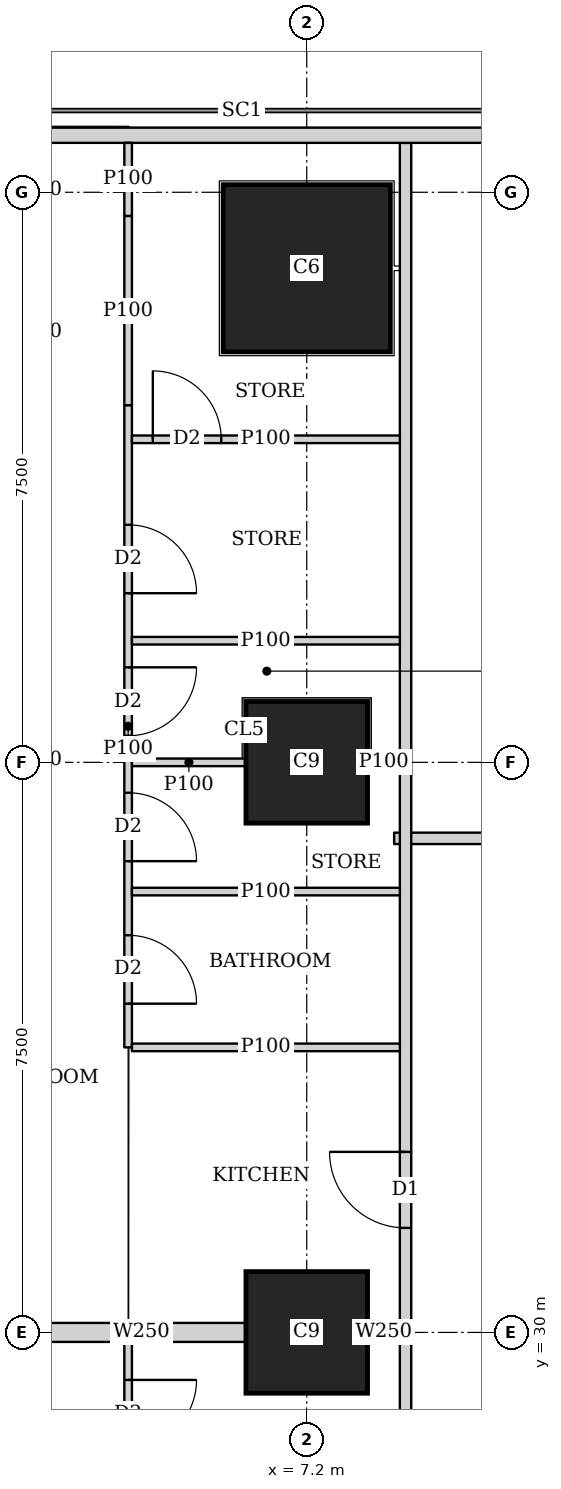
"""IFC4 building model, lengths in metres.
Left out: names, types, materials, properties, quantities, classifications, styles, units other than length and angle.
Written with IfcOpenShell. Run it as: python <this file> out.ifc"""

import sys

from ifc_helpers import new_model, si_unit, direction, frame, frame_2d, origin, origin_2d, place, context, subcontext, project, spatial, rectangle, extrude, element, fill, save


model = new_model("IFC4")
c1 = context("Model", 3, precision=1e-05, world=origin(), true_north=direction((0.0, 1.0)))
c2 = subcontext(c1, "Body", "Model", "MODEL_VIEW")
j1 = project(units=[si_unit("LENGTHUNIT", "METRE"), si_unit("PLANEANGLEUNIT", "RADIAN")], contexts=[c1])
p1 = place(None, origin())
s1 = spatial("IfcSite", under=j1, at=p1, CompositionType="ELEMENT")
p2 = place(p1, origin())
s2 = spatial("IfcBuilding", under=s1, at=p2, CompositionType="ELEMENT")
p3 = place(p2, frame((0.0, 0.0, 89.15)))
s3 = spatial("IfcBuildingStorey", under=s2, at=p3, CompositionType="ELEMENT", Elevation=89.15)
for number, where, z_axis, x_axis in (
    (1, (7.2, 30.0, 0.0), (0.0, 0.0, 1.0), (1.0, 0.0, 0.0)),
    (2, (7.2, 37.5, 0.0), (0.0, 0.0, 1.0), (1.0, 0.0, 0.0)),
):
    element("IfcColumn", number, at=place(p3, frame(where, z_axis=z_axis, x_axis=x_axis)), inside=s3, PredefinedType="COLUMN", context=c2, shape_type="SweptSolid", body=[
        extrude(rectangle(XDim=1.6, YDim=1.6, at=origin_2d()), origin(), (0.0, 0.0, 1.0), 3.75),
    ])
p4 = place(p3, frame((7.2, 44.0, 0.0), z_axis=(0.0, 0.0, 1.0), x_axis=(1.0, 0.0, 0.0)))
e3 = element("IfcColumn", 3, at=p4, inside=s3, PredefinedType="COLUMN", context=c2, shape_type="SweptSolid", body=[
    extrude(rectangle(XDim=2.2, YDim=2.2, at=origin_2d()), origin(), (0.0, 0.0, 1.0), 3.75),
])
p5 = place(p3, frame((40.106, 45.75, 0.0), z_axis=(0.0, 0.0, 1.0), x_axis=(-1.0, 0.0, 0.0)))
e4 = element("IfcWall", 4, at=p5, inside=s3, PredefinedType="SOLIDWALL", context=c2, shape_type="SweptSolid", body=[
    extrude(rectangle(XDim=37.943, YDim=0.2, at=frame_2d((18.971, 0.0))), origin(), (0.0, 0.0, 1.0), 3.5),
])
p6 = place(p5, frame((8.606, 0.0, 0.9)))
e5 = element("IfcOpeningElement", 5, at=p6, cuts=e4, PredefinedType="OPENING", context=c2, shape_type="SweptSolid", body=[
    extrude(rectangle(XDim=1.8, YDim=1.5, at=frame_2d((0.9, 0.75))), frame((0.0, 0.11, 0.0), z_axis=(0.0, -1.0, 0.0), x_axis=(1.0, 0.0, 0.0)), (0.0, 0.0, 1.0), 0.22),
])
p7 = place(p5, frame((12.206, 0.0, 0.9)))
e6 = element("IfcOpeningElement", 6, at=p7, cuts=e4, PredefinedType="OPENING", context=c2, shape_type="SweptSolid", body=[
    extrude(rectangle(XDim=1.8, YDim=1.5, at=frame_2d((0.9, 0.75))), frame((0.0, 0.11, 0.0), z_axis=(0.0, -1.0, 0.0), x_axis=(1.0, 0.0, 0.0)), (0.0, 0.0, 1.0), 0.22),
])
p8 = place(p5, frame((15.806, 0.0, 0.9)))
e7 = element("IfcOpeningElement", 7, at=p8, cuts=e4, PredefinedType="OPENING", context=c2, shape_type="SweptSolid", body=[
    extrude(rectangle(XDim=1.8, YDim=1.5, at=frame_2d((0.9, 0.75))), frame((0.0, 0.11, 0.0), z_axis=(0.0, -1.0, 0.0), x_axis=(1.0, 0.0, 0.0)), (0.0, 0.0, 1.0), 0.22),
])
p9 = place(p5, frame((19.406, 0.0, 0.9)))
e8 = element("IfcOpeningElement", 8, at=p9, cuts=e4, PredefinedType="OPENING", context=c2, shape_type="SweptSolid", body=[
    extrude(rectangle(XDim=1.8, YDim=1.5, at=frame_2d((0.9, 0.75))), frame((0.0, 0.11, 0.0), z_axis=(0.0, -1.0, 0.0), x_axis=(1.0, 0.0, 0.0)), (0.0, 0.0, 1.0), 0.22),
])
p10 = place(p5, frame((23.006, 0.0, 0.9)))
e9 = element("IfcOpeningElement", 9, at=p10, cuts=e4, PredefinedType="OPENING", context=c2, shape_type="SweptSolid", body=[
    extrude(rectangle(XDim=1.8, YDim=1.5, at=frame_2d((0.9, 0.75))), frame((0.0, 0.11, 0.0), z_axis=(0.0, -1.0, 0.0), x_axis=(1.0, 0.0, 0.0)), (0.0, 0.0, 1.0), 0.22),
])
p11 = place(p5, frame((26.606, 0.0, 0.9)))
e10 = element("IfcOpeningElement", 10, at=p11, cuts=e4, PredefinedType="OPENING", context=c2, shape_type="SweptSolid", body=[
    extrude(rectangle(XDim=1.8, YDim=1.5, at=frame_2d((0.9, 0.75))), frame((0.0, 0.11, 0.0), z_axis=(0.0, -1.0, 0.0), x_axis=(1.0, 0.0, 0.0)), (0.0, 0.0, 1.0), 0.22),
])
p12 = place(p3, frame((8.5, -0.65, 0.0), z_axis=(0.0, 0.0, 1.0), x_axis=(0.0, 1.0, 0.0)))
e11 = element("IfcWall", 11, at=p12, inside=s3, PredefinedType="SOLIDWALL", context=c2, shape_type="SweptSolid", body=[
    extrude(rectangle(XDim=46.3, YDim=0.15, at=frame_2d((23.15, 0.0))), origin(), (0.0, 0.0, 1.0), 2.2),
])
p13 = place(p12, frame((9.525, 0.0, 0.0)))
e12 = element("IfcOpeningElement", 12, at=p13, cuts=e11, PredefinedType="OPENING", context=c2, shape_type="SweptSolid", body=[
    extrude(rectangle(XDim=1.0, YDim=2.1, at=frame_2d((0.5, 1.05))), frame((0.0, 0.085, 0.0), z_axis=(0.0, -1.0, 0.0), x_axis=(1.0, 0.0, 0.0)), (0.0, 0.0, 1.0), 0.17),
])
p14 = place(p12, frame((13.275, 0.0, 0.0)))
e13 = element("IfcOpeningElement", 13, at=p14, cuts=e11, PredefinedType="OPENING", context=c2, shape_type="SweptSolid", body=[
    extrude(rectangle(XDim=1.0, YDim=2.1, at=frame_2d((0.5, 1.05))), frame((0.0, 0.085, 0.0), z_axis=(0.0, -1.0, 0.0), x_axis=(1.0, 0.0, 0.0)), (0.0, 0.0, 1.0), 0.17),
])
p15 = place(p12, frame((20.775, 0.0, 0.0)))
e14 = element("IfcOpeningElement", 14, at=p15, cuts=e11, PredefinedType="OPENING", context=c2, shape_type="SweptSolid", body=[
    extrude(rectangle(XDim=1.0, YDim=2.1, at=frame_2d((0.5, 1.05))), frame((0.0, 0.085, 0.0), z_axis=(0.0, -1.0, 0.0), x_axis=(1.0, 0.0, 0.0)), (0.0, 0.0, 1.0), 0.17),
])
p16 = place(p12, frame((32.025, 0.0, 0.0)))
e15 = element("IfcOpeningElement", 15, at=p16, cuts=e11, PredefinedType="OPENING", context=c2, shape_type="SweptSolid", body=[
    extrude(rectangle(XDim=1.0, YDim=2.1, at=frame_2d((0.5, 1.05))), frame((0.0, 0.085, 0.0), z_axis=(0.0, -1.0, 0.0), x_axis=(1.0, 0.0, 0.0)), (0.0, 0.0, 1.0), 0.17),
])
p17 = place(p3, frame((8.35, 36.5, 0.0), z_axis=(0.0, 0.0, 1.0), x_axis=(1.0, 0.0, 0.0)))
e16 = element("IfcWall", 16, at=p17, inside=s3, PredefinedType="SOLIDWALL", context=c2, shape_type="SweptSolid", body=[
    extrude(rectangle(XDim=26.415, YDim=0.15, at=frame_2d((13.208, 0.0))), origin(), (0.0, 0.0, 1.0), 3.5),
])
p18 = place(p17, frame((2.6, 0.0, 0.0)))
e17 = element("IfcOpeningElement", 17, at=p18, cuts=e16, PredefinedType="OPENING", context=c2, shape_type="SweptSolid", body=[
    extrude(rectangle(XDim=1.0, YDim=2.1, at=frame_2d((0.5, 1.05))), frame((0.0, 0.085, 0.0), z_axis=(0.0, -1.0, 0.0), x_axis=(1.0, 0.0, 0.0)), (0.0, 0.0, 1.0), 0.17),
])
p19 = place(p17, frame((10.75, 0.0, 0.0)))
e18 = element("IfcOpeningElement", 18, at=p19, cuts=e16, PredefinedType="OPENING", context=c2, shape_type="SweptSolid", body=[
    extrude(rectangle(XDim=1.0, YDim=2.1, at=frame_2d((0.5, 1.05))), frame((0.0, 0.085, 0.0), z_axis=(0.0, -1.0, 0.0), x_axis=(1.0, 0.0, 0.0)), (0.0, 0.0, 1.0), 0.17),
])
p20 = place(p17, frame((18.007, 0.0, 0.0)))
e19 = element("IfcOpeningElement", 19, at=p20, cuts=e16, PredefinedType="OPENING", context=c2, shape_type="SweptSolid", body=[
    extrude(rectangle(XDim=1.0, YDim=2.1, at=frame_2d((0.5, 1.05))), frame((0.0, 0.085, 0.0), z_axis=(0.0, -1.0, 0.0), x_axis=(1.0, 0.0, 0.0)), (0.0, 0.0, 1.0), 0.17),
])
p21 = place(p3, frame((4.85, 22.5, 0.0), z_axis=(0.0, 0.0, 1.0), x_axis=(0.0, 1.0, 0.0)))
e20 = element("IfcWall", 20, at=p21, inside=s3, PredefinedType="PARTITIONING", context=c2, shape_type="SweptSolid", body=[
    extrude(rectangle(XDim=7.375, YDim=0.1, at=frame_2d((3.688, 0.0))), origin(), (0.0, 0.0, 1.0), 3.5),
])
p22 = place(p21, frame((0.575, 0.0, 0.0)))
e21 = element("IfcOpeningElement", 21, at=p22, cuts=e20, PredefinedType="OPENING", context=c2, shape_type="SweptSolid", body=[
    extrude(rectangle(XDim=0.9, YDim=2.1, at=frame_2d((0.45, 1.05))), frame((0.0, 0.06, 0.0), z_axis=(0.0, -1.0, 0.0), x_axis=(1.0, 0.0, 0.0)), (0.0, 0.0, 1.0), 0.12),
])
p23 = place(p21, frame((4.1, 0.0, 0.0)))
e22 = element("IfcOpeningElement", 22, at=p23, cuts=e20, PredefinedType="OPENING", context=c2, shape_type="SweptSolid", body=[
    extrude(rectangle(XDim=0.9, YDim=2.1, at=frame_2d((0.45, 1.05))), frame((0.0, 0.06, 0.0), z_axis=(0.0, -1.0, 0.0), x_axis=(1.0, 0.0, 0.0)), (0.0, 0.0, 1.0), 0.12),
])
p24 = place(p21, frame((2.45, 0.0, 0.0)))
e23 = element("IfcOpeningElement", 23, at=p24, cuts=e20, PredefinedType="OPENING", context=c2, shape_type="SweptSolid", body=[
    extrude(rectangle(XDim=0.9, YDim=2.1, at=frame_2d((0.45, 1.05))), frame((0.0, 0.06, 0.0), z_axis=(0.0, -1.0, 0.0), x_axis=(1.0, 0.0, 0.0)), (0.0, 0.0, 1.0), 0.12),
])
p25 = place(p21, frame((5.975, 0.0, 0.0)))
e24 = element("IfcOpeningElement", 24, at=p25, cuts=e20, PredefinedType="OPENING", context=c2, shape_type="SweptSolid", body=[
    extrude(rectangle(XDim=0.9, YDim=2.1, at=frame_2d((0.45, 1.05))), frame((0.0, 0.06, 0.0), z_axis=(0.0, -1.0, 0.0), x_axis=(1.0, 0.0, 0.0)), (0.0, 0.0, 1.0), 0.12),
])
p26 = place(p3, frame((4.85, 33.75, 0.0), z_axis=(0.0, 0.0, 1.0), x_axis=(0.0, 1.0, 0.0)))
e25 = element("IfcWall", 25, at=p26, inside=s3, PredefinedType="PARTITIONING", context=c2, shape_type="SweptSolid", body=[
    extrude(rectangle(XDim=8.449, YDim=0.1, at=frame_2d((4.225, 0.0))), origin(), (0.0, 0.0, 1.0), 3.5),
])
p27 = place(p26, frame((0.575, 0.0, 0.0)))
e26 = element("IfcOpeningElement", 26, at=p27, cuts=e25, PredefinedType="OPENING", context=c2, shape_type="SweptSolid", body=[
    extrude(rectangle(XDim=0.9, YDim=2.1, at=frame_2d((0.45, 1.05))), frame((0.0, 0.06, 0.0), z_axis=(0.0, -1.0, 0.0), x_axis=(1.0, 0.0, 0.0)), (0.0, 0.0, 1.0), 0.12),
])
p28 = place(p26, frame((4.1, 0.0, 0.0)))
e27 = element("IfcOpeningElement", 27, at=p28, cuts=e25, PredefinedType="OPENING", context=c2, shape_type="SweptSolid", body=[
    extrude(rectangle(XDim=0.9, YDim=2.1, at=frame_2d((0.45, 1.05))), frame((0.0, 0.06, 0.0), z_axis=(0.0, -1.0, 0.0), x_axis=(1.0, 0.0, 0.0)), (0.0, 0.0, 1.0), 0.12),
])
p29 = place(p26, frame((2.45, 0.0, 0.0)))
e28 = element("IfcOpeningElement", 28, at=p29, cuts=e25, PredefinedType="OPENING", context=c2, shape_type="SweptSolid", body=[
    extrude(rectangle(XDim=0.9, YDim=2.1, at=frame_2d((0.45, 1.05))), frame((0.0, 0.06, 0.0), z_axis=(0.0, -1.0, 0.0), x_axis=(1.0, 0.0, 0.0)), (0.0, 0.0, 1.0), 0.12),
])
p30 = place(p26, frame((5.975, 0.0, 0.0)))
e29 = element("IfcOpeningElement", 29, at=p30, cuts=e25, PredefinedType="OPENING", context=c2, shape_type="SweptSolid", body=[
    extrude(rectangle(XDim=0.9, YDim=2.1, at=frame_2d((0.45, 1.05))), frame((0.0, 0.06, 0.0), z_axis=(0.0, -1.0, 0.0), x_axis=(1.0, 0.0, 0.0)), (0.0, 0.0, 1.0), 0.12),
])
p31 = place(p3, frame((4.85, 42.199, 0.0), z_axis=(0.0, 0.0, 1.0), x_axis=(0.0, 1.0, 0.0)))
e30 = element("IfcWall", 30, at=p31, inside=s3, PredefinedType="PARTITIONING", context=c2, shape_type="SweptSolid", body=[
    extrude(rectangle(XDim=2.49, YDim=0.1, at=frame_2d((1.245, 0.0))), origin(), (0.0, 0.0, 1.0), 2.05),
])
p32 = place(p3, frame((4.85, 44.689, 0.0), z_axis=(0.0, 0.0, 1.0), x_axis=(0.0, 1.0, 0.0)))
e31 = element("IfcWall", 31, at=p32, inside=s3, PredefinedType="PARTITIONING", context=c2, shape_type="SweptSolid", body=[
    extrude(rectangle(XDim=0.961, YDim=0.1, at=frame_2d((0.48, 0.0))), origin(), (0.0, 0.0, 1.0), 3.5),
])
p33 = place(p3, frame((4.9, 33.75, 0.0), z_axis=(0.0, 0.0, 1.0), x_axis=(1.0, 0.0, 0.0)))
e32 = element("IfcWall", 32, at=p33, inside=s3, PredefinedType="PARTITIONING", context=c2, shape_type="SweptSolid", body=[
    extrude(rectangle(XDim=3.525, YDim=0.1, at=frame_2d((1.763, 0.0))), origin(), (0.0, 0.0, 1.0), 3.5),
])
p34 = place(p3, frame((4.9, 37.5, 0.0), z_axis=(0.0, 0.0, 1.0), x_axis=(1.0, 0.0, 0.0)))
e33 = element("IfcWall", 33, at=p34, inside=s3, PredefinedType="PARTITIONING", context=c2, shape_type="SweptSolid", body=[
    extrude(rectangle(XDim=1.499, YDim=0.1, at=frame_2d((0.75, 0.0))), origin(), (0.0, 0.0, 1.0), 3.5),
])
p35 = place(p3, frame((8.001, 37.5, 0.0), z_axis=(0.0, 0.0, 1.0), x_axis=(1.0, 0.0, 0.0)))
e34 = element("IfcWall", 34, at=p35, inside=s3, PredefinedType="PARTITIONING", context=c2, shape_type="SweptSolid", body=[
    extrude(rectangle(XDim=0.424, YDim=0.1, at=frame_2d((0.212, 0.0))), origin(), (0.0, 0.0, 1.0), 3.5),
])
for number, where, z_axis, x_axis in (
    (35, (4.9, 35.8, 0.0), (0.0, 0.0, 1.0), (1.0, 0.0, 0.0)),
    (36, (4.9, 39.1, 0.0), (0.0, 0.0, 1.0), (1.0, 0.0, 0.0)),
):
    element("IfcWall", number, at=place(p3, frame(where, z_axis=z_axis, x_axis=x_axis)), inside=s3, PredefinedType="PARTITIONING", context=c2, shape_type="SweptSolid", body=[
        extrude(rectangle(XDim=3.525, YDim=0.1, at=frame_2d((1.763, 0.0))), origin(), (0.0, 0.0, 1.0), 3.5),
    ])
p36 = place(p3, frame((3.65, 30.0, 0.0), z_axis=(0.0, 0.0, 1.0), x_axis=(1.0, 0.0, 0.0)))
e37 = element("IfcWall", 37, at=p36, inside=s3, PredefinedType="SOLIDWALL", context=c2, shape_type="SweptSolid", body=[
    extrude(rectangle(XDim=2.749, YDim=0.25, at=frame_2d((1.375, 0.0))), origin(), (0.0, 0.0, 1.0), 3.5),
])
p37 = place(p3, frame((8.001, 30.0, 0.0), z_axis=(0.0, 0.0, 1.0), x_axis=(1.0, 0.0, 0.0)))
e38 = element("IfcWall", 38, at=p37, inside=s3, PredefinedType="SOLIDWALL", context=c2, shape_type="SweptSolid", body=[
    extrude(rectangle(XDim=0.424, YDim=0.25, at=frame_2d((0.212, 0.0))), origin(), (0.0, 0.0, 1.0), 3.5),
])
p38 = place(p3, frame((8.425, 41.75, 0.0), z_axis=(0.0, 0.0, 1.0), x_axis=(-1.0, 0.0, 0.0)))
e39 = element("IfcWall", 39, at=p38, inside=s3, PredefinedType="PARTITIONING", context=c2, shape_type="SweptSolid", body=[
    extrude(rectangle(XDim=3.525, YDim=0.1, at=frame_2d((1.763, 0.0))), origin(), (0.0, 0.0, 1.0), 3.5),
])
p39 = place(p38, frame((2.35, 0.0, 0.0)))
e40 = element("IfcOpeningElement", 40, at=p39, cuts=e39, PredefinedType="OPENING", context=c2, shape_type="SweptSolid", body=[
    extrude(rectangle(XDim=0.9, YDim=2.1, at=frame_2d((0.45, 1.05))), frame((0.0, 0.06, 0.0), z_axis=(0.0, -1.0, 0.0), x_axis=(1.0, 0.0, 0.0)), (0.0, 0.0, 1.0), 0.12),
])
p40 = place(p25, origin())
e41 = element("IfcDoor", 41, at=p40, inside=s3, OperationType="SINGLE_SWING_LEFT", PredefinedType="DOOR", context=c2, shape_type="SweptSolid", body=[
    extrude(rectangle(XDim=0.9, YDim=2.1, at=frame_2d((0.45, 1.05))), frame((0.0, 0.025, 0.0), z_axis=(0.0, -1.0, 0.0), x_axis=(1.0, 0.0, 0.0)), (0.0, 0.0, 1.0), 0.05),
])
fill(e24, e41)
p41 = place(p27, origin())
e42 = element("IfcDoor", 42, at=p41, inside=s3, OperationType="SINGLE_SWING_RIGHT", PredefinedType="DOOR", context=c2, shape_type="SweptSolid", body=[
    extrude(rectangle(XDim=0.9, YDim=2.1, at=frame_2d((0.45, 1.05))), frame((0.0, 0.025, 0.0), z_axis=(0.0, -1.0, 0.0), x_axis=(1.0, 0.0, 0.0)), (0.0, 0.0, 1.0), 0.05),
])
fill(e26, e42)
p42 = place(p28, origin())
e43 = element("IfcDoor", 43, at=p42, inside=s3, OperationType="SINGLE_SWING_LEFT", PredefinedType="DOOR", context=c2, shape_type="SweptSolid", body=[
    extrude(rectangle(XDim=0.9, YDim=2.1, at=frame_2d((0.45, 1.05))), frame((0.0, 0.025, 0.0), z_axis=(0.0, -1.0, 0.0), x_axis=(1.0, 0.0, 0.0)), (0.0, 0.0, 1.0), 0.05),
])
fill(e27, e43)
p43 = place(p29, origin())
e44 = element("IfcDoor", 44, at=p43, inside=s3, OperationType="SINGLE_SWING_RIGHT", PredefinedType="DOOR", context=c2, shape_type="SweptSolid", body=[
    extrude(rectangle(XDim=0.9, YDim=2.1, at=frame_2d((0.45, 1.05))), frame((0.0, 0.025, 0.0), z_axis=(0.0, -1.0, 0.0), x_axis=(1.0, 0.0, 0.0)), (0.0, 0.0, 1.0), 0.05),
])
fill(e28, e44)
p44 = place(p30, origin())
e45 = element("IfcDoor", 45, at=p44, inside=s3, OperationType="SINGLE_SWING_RIGHT", PredefinedType="DOOR", context=c2, shape_type="SweptSolid", body=[
    extrude(rectangle(XDim=0.9, YDim=2.1, at=frame_2d((0.45, 1.05))), frame((0.0, 0.025, 0.0), z_axis=(0.0, -1.0, 0.0), x_axis=(1.0, 0.0, 0.0)), (0.0, 0.0, 1.0), 0.05),
])
fill(e29, e45)
p45 = place(p16, origin())
e46 = element("IfcDoor", 46, at=p45, inside=s3, OperationType="SINGLE_SWING_RIGHT", PredefinedType="DOOR", context=c2, shape_type="SweptSolid", body=[
    extrude(rectangle(XDim=1.0, YDim=2.1, at=frame_2d((0.5, 1.05))), frame((0.0, 0.025, 0.0), z_axis=(0.0, -1.0, 0.0), x_axis=(1.0, 0.0, 0.0)), (0.0, 0.0, 1.0), 0.05),
])
fill(e15, e46)
p46 = place(p39, origin())
e47 = element("IfcDoor", 47, at=p46, inside=s3, OperationType="SINGLE_SWING_LEFT", PredefinedType="DOOR", context=c2, shape_type="SweptSolid", body=[
    extrude(rectangle(XDim=0.9, YDim=2.1, at=frame_2d((0.45, 1.05))), frame((0.0, 0.025, 0.0), z_axis=(0.0, -1.0, 0.0), x_axis=(1.0, 0.0, 0.0)), (0.0, 0.0, 1.0), 0.05),
])
fill(e40, e47)
save(model, sys.argv[1])
